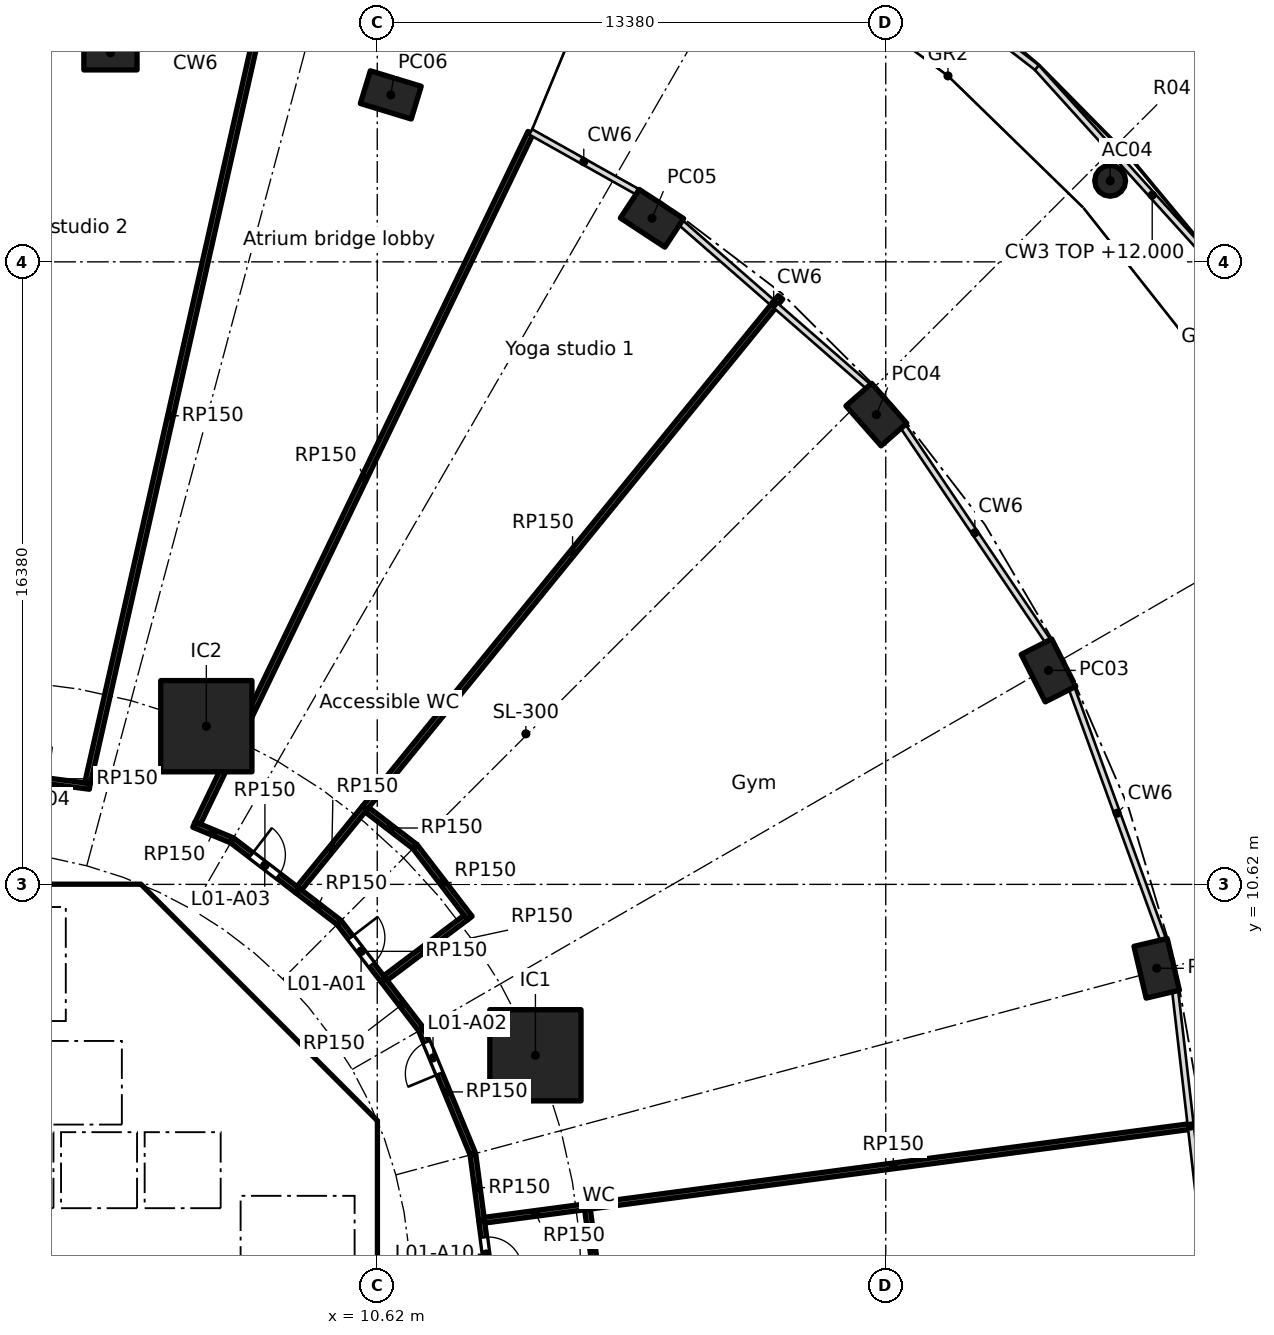
"""IFC4 building model, lengths in metres.
Left out: names, types, materials, properties, quantities, classifications, styles, units other than length and angle.
Written with IfcOpenShell. Run it as: python <this file> out.ifc"""

import sys

from ifc_helpers import new_model, si_unit, direction, frame, frame_2d, origin, origin_2d, place, context, subcontext, project, spatial, polyline, rectangle, hollow_rectangle, hollow_circle, outline, extrude, element, fill, save


model = new_model("IFC4")
c1 = context("Model", 3, precision=1e-05, world=origin(), true_north=direction((0.0, 1.0)))
c2 = subcontext(c1, "Body", "Model", "MODEL_VIEW")
j1 = project(units=[si_unit("LENGTHUNIT", "METRE"), si_unit("PLANEANGLEUNIT", "RADIAN")], contexts=[c1])
p1 = place(None, origin())
s1 = spatial("IfcSite", under=j1, at=p1, CompositionType="ELEMENT")
p2 = place(p1, origin())
s2 = spatial("IfcBuilding", under=s1, at=p2, CompositionType="ELEMENT")
p3 = place(p2, frame((0.0, 0.0, 7.0)))
s3 = spatial("IfcBuildingStorey", under=s2, at=p3, CompositionType="ELEMENT", Elevation=7.0)
for number, where, z_axis, x_axis in (
    (1, (31.129, 8.412, 0.0), (0.0, 0.0, 1.0), (-0.229, 0.973, 0.0)),
    (2, (28.282, 16.25, 0.0), (0.0, 0.0, 1.0), (-0.452, 0.892, 0.0)),
    (3, (23.752, 22.981, 0.0), (0.0, 0.0, 1.0), (-0.66, 0.751, 0.0)),
    (4, (17.85, 28.146, 0.0), (0.0, 0.0, 1.0), (-0.836, 0.549, 0.0)),
    (5, (10.976, 31.393, 0.0), (0.0, 0.0, 1.0), (-0.957, 0.292, 0.0)),
    (6, (3.6, 32.5, 0.0), (0.0, 0.0, 1.0), (-1.0, 0.0, 0.0)),
):
    element("IfcColumn", number, at=place(p3, frame(where, z_axis=z_axis, x_axis=x_axis)), inside=s3, PredefinedType="COLUMN", context=c2, shape_type="SweptSolid", body=[
        extrude(hollow_rectangle(XDim=1.4, YDim=0.9, WallThickness=0.05, at=origin_2d()), origin(), (0.0, 0.0, 1.0), 5.0),
    ])
for number, where, z_axis, x_axis in (
    (7, (14.782, 6.123, 0.0), (0.0, 0.0, 1.0), (1.0, 0.0, 0.0)),
    (8, (6.123, 14.782, 0.0), (0.0, 0.0, 1.0), (1.0, 0.0, 0.0)),
):
    element("IfcColumn", number, at=place(p3, frame(where, z_axis=z_axis, x_axis=x_axis)), inside=s3, PredefinedType="COLUMN", context=c2, shape_type="SweptSolid", body=[
        extrude(rectangle(XDim=2.4, YDim=2.4, at=origin_2d()), origin(), (0.0, 0.0, 1.0), 5.0),
    ])
p4 = place(p3, frame((29.904, 29.133, 0.0), z_axis=(0.0, 0.0, 1.0), x_axis=(1.0, 0.0, 0.0)))
e9 = element("IfcColumn", 9, at=p4, inside=s3, PredefinedType="COLUMN", context=c2, shape_type="SweptSolid", body=[
    extrude(hollow_circle(Radius=0.406, WallThickness=0.025, at=origin_2d()), origin(), (0.0, 0.0, 1.0), 5.0),
])
p5 = place(p3, frame((9.988, 4.613, 0.0), z_axis=(0.0, 0.0, 1.0), x_axis=(-0.707106781187, 0.707106781187, 0.0)))
e10 = element("IfcWall", 10, at=p5, inside=s3, PredefinedType="SHEAR", context=c2, shape_type="SweptSolid", body=[
    extrude(rectangle(XDim=7.602, YDim=0.6, at=frame_2d((3.801, 0.0))), origin(), (0.0, 0.0, 1.0), 4.7),
])
p6 = place(p5, frame((3.201, 0.0, 0.0)))
e11 = element("IfcOpeningElement", 11, at=p6, cuts=e10, PredefinedType="OPENING", context=c2, shape_type="SweptSolid", body=[
    extrude(rectangle(XDim=1.2, YDim=2.1, at=frame_2d((0.6, 1.05))), frame((0.0, 0.31, 0.0), z_axis=(0.0, -1.0, 0.0), x_axis=(1.0, 0.0, 0.0)), (0.0, 0.0, 1.0), 0.62),
])
p7 = place(p3, frame((4.0, 4.3, 0.0), z_axis=(0.0, 0.0, 1.0), x_axis=(0.0, 1.0, 0.0)))
e12 = element("IfcWall", 12, at=p7, inside=s3, PredefinedType="SOLIDWALL", context=c2, shape_type="SweptSolid", body=[
    extrude(rectangle(XDim=2.2, YDim=0.2, at=frame_2d((1.1, 0.0))), origin(), (0.0, 0.0, 1.0), 4.7),
])
p8 = place(p7, frame((0.55, 0.0, 0.0)))
e13 = element("IfcOpeningElement", 13, at=p8, cuts=e12, PredefinedType="OPENING", context=c2, shape_type="SweptSolid", body=[
    extrude(rectangle(XDim=1.1, YDim=2.1, at=frame_2d((0.55, 1.05))), frame((0.0, 0.11, 0.0), z_axis=(0.0, -1.0, 0.0), x_axis=(1.0, 0.0, 0.0)), (0.0, 0.0, 1.0), 0.22),
])
p9 = place(p3, frame((-6.7, 2.0, 0.0), z_axis=(0.0, 0.0, 1.0), x_axis=(1.0, 0.0, 0.0)))
e14 = element("IfcWall", 14, at=p9, inside=s3, PredefinedType="SOLIDWALL", context=c2, shape_type="SweptSolid", body=[
    extrude(rectangle(XDim=13.4, YDim=0.2, at=frame_2d((6.7, 0.0))), origin(), (0.0, 0.0, 1.0), 4.7),
])
p10 = place(p9, frame((0.65, 0.0, 0.0)))
e15 = element("IfcOpeningElement", 15, at=p10, cuts=e14, PredefinedType="OPENING", context=c2, shape_type="SweptSolid", body=[
    extrude(rectangle(XDim=1.1, YDim=2.1, at=frame_2d((0.55, 1.05))), frame((0.0, 0.11, 0.0), z_axis=(0.0, -1.0, 0.0), x_axis=(1.0, 0.0, 0.0)), (0.0, 0.0, 1.0), 0.22),
])
p11 = place(p9, frame((2.85, 0.0, 0.0)))
e16 = element("IfcOpeningElement", 16, at=p11, cuts=e14, PredefinedType="OPENING", context=c2, shape_type="SweptSolid", body=[
    extrude(rectangle(XDim=1.1, YDim=2.1, at=frame_2d((0.55, 1.05))), frame((0.0, 0.11, 0.0), z_axis=(0.0, -1.0, 0.0), x_axis=(1.0, 0.0, 0.0)), (0.0, 0.0, 1.0), 0.22),
])
p12 = place(p9, frame((5.05, 0.0, 0.0)))
e17 = element("IfcOpeningElement", 17, at=p12, cuts=e14, PredefinedType="OPENING", context=c2, shape_type="SweptSolid", body=[
    extrude(rectangle(XDim=1.1, YDim=2.1, at=frame_2d((0.55, 1.05))), frame((0.0, 0.11, 0.0), z_axis=(0.0, -1.0, 0.0), x_axis=(1.0, 0.0, 0.0)), (0.0, 0.0, 1.0), 0.22),
])
p13 = place(p3, frame((6.7, 4.0, 0.0), z_axis=(0.0, 0.0, 1.0), x_axis=(1.0, 0.0, 0.0)))
e18 = element("IfcWall", 18, at=p13, inside=s3, PredefinedType="SOLIDWALL", context=c2, shape_type="SweptSolid", body=[
    extrude(rectangle(XDim=3.325, YDim=0.2, at=frame_2d((1.662, 0.0))), origin(), (0.0, 0.0, 1.0), 4.7),
])
p14 = place(p13, frame((1.25, 0.0, 0.0)))
e19 = element("IfcOpeningElement", 19, at=p14, cuts=e18, PredefinedType="OPENING", context=c2, shape_type="SweptSolid", body=[
    extrude(rectangle(XDim=1.1, YDim=2.1, at=frame_2d((0.55, 1.05))), frame((0.0, 0.11, 0.0), z_axis=(0.0, -1.0, 0.0), x_axis=(1.0, 0.0, 0.0)), (0.0, 0.0, 1.0), 0.22),
])
p15 = place(p3, frame((4.0, 7.025, 0.0), z_axis=(0.0, 0.0, 1.0), x_axis=(0.0, 1.0, 0.0)))
e20 = element("IfcWall", 20, at=p15, inside=s3, PredefinedType="SOLIDWALL", context=c2, shape_type="SweptSolid", body=[
    extrude(rectangle(XDim=3.0, YDim=0.2, at=frame_2d((1.5, 0.0))), origin(), (0.0, 0.0, 1.0), 4.7),
])
p16 = place(p15, frame((0.925, 0.0, 0.0)))
e21 = element("IfcOpeningElement", 21, at=p16, cuts=e20, PredefinedType="OPENING", context=c2, shape_type="SweptSolid", body=[
    extrude(rectangle(XDim=1.1, YDim=2.1, at=frame_2d((0.55, 1.05))), frame((0.0, 0.11, 0.0), z_axis=(0.0, -1.0, 0.0), x_axis=(1.0, 0.0, 0.0)), (0.0, 0.0, 1.0), 0.22),
])
p17 = place(p3, origin())
e22 = element("IfcWall", 22, at=p17, inside=s3, PredefinedType="SHEAR", context=c2, shape_type="SweptSolid", body=[
    extrude(outline(polyline([(-4.152, 10.025), (-4.401, 9.776), (-4.825, 10.2), (-4.401, 10.625), (4.401, 10.625), (4.825, 10.2), (4.401, 9.776), (4.152, 10.025), (-4.152, 10.025)])), origin(), (0.0, 0.0, 1.0), 4.7),
])
p18 = place(p3, origin())
e23 = element("IfcWall", 23, at=p18, inside=s3, PredefinedType="SHEAR", context=c2, shape_type="SweptSolid", body=[
    extrude(outline(polyline([(9.776, -4.401), (10.025, -4.152), (10.025, -3.801), (10.025, 4.152), (9.776, 4.401), (10.2, 4.825), (10.625, 4.401), (10.625, -4.401), (10.2, -4.825), (9.776, -4.401)])), origin(), (0.0, 0.0, 1.0), 4.7),
])
p19 = place(p3, origin())
e24 = element("IfcWall", 24, at=p19, inside=s3, PredefinedType="SOLIDWALL", context=c2, shape_type="SweptSolid", body=[
    extrude(outline(polyline([(-6.5, 2.1), (-6.7, 2.1), (-6.7, 4.3), (6.7, 4.3), (6.7, 2.1), (6.5, 2.1), (6.5, 4.1), (4.5, 4.1), (4.5, 2.1), (4.3, 2.1), (4.3, 4.1), (2.3, 4.1), (2.3, 2.1), (2.1, 2.1), (2.1, 4.1), (0.1, 4.1), (0.1, 2.1), (-0.1, 2.1), (-0.1, 4.1), (-2.1, 4.1), (-2.1, 2.1), (-2.3, 2.1), (-2.3, 4.1), (-4.3, 4.1), (-4.3, 2.1), (-4.5, 2.1), (-4.5, 4.1), (-6.5, 4.1), (-6.5, 2.1)])), origin(), (0.0, 0.0, 1.0), 4.7),
])
p20 = place(p3, origin())
e25 = element("IfcWall", 25, at=p20, inside=s3, PredefinedType="SOLIDWALL", context=c2, shape_type="SweptSolid", body=[
    extrude(outline(polyline([(4.1, 6.5), (-4.1, 6.5), (-4.1, 7.025), (4.1, 7.025), (4.1, 6.5)])), origin(), (0.0, 0.0, 1.0), 4.7),
])
p21 = place(p3, origin())
e26 = element("IfcWall", 26, at=p21, inside=s3, PredefinedType="SOLIDWALL", context=c2, shape_type="SweptSolid", body=[
    extrude(outline(polyline([(7.025, -3.9), (6.7, -3.9), (6.7, 3.9), (7.025, 3.9), (7.025, -3.9)])), origin(), (0.0, 0.0, 1.0), 4.7),
])
p22 = place(p3, frame((0.012, 13.598, 0.0), z_axis=(0.0, 0.0, 1.0), x_axis=(0.991450776896, -0.130481251495, 0.0)))
e27 = element("IfcWall", 27, at=p22, inside=s3, PredefinedType="PARTITIONING", context=c2, shape_type="SweptSolid", body=[
    extrude(rectangle(XDim=3.071, YDim=0.15, at=frame_2d((1.535, 0.0))), origin(), (0.0, 0.0, 1.0), 4.7),
])
p23 = place(p22, frame((1.042, 0.0, 0.0)))
e28 = element("IfcOpeningElement", 28, at=p23, cuts=e27, PredefinedType="OPENING", context=c2, shape_type="SweptSolid", body=[
    extrude(rectangle(XDim=0.9, YDim=2.1, at=frame_2d((0.45, 1.05))), frame((0.0, 0.085, 0.0), z_axis=(0.0, -1.0, 0.0), x_axis=(1.0, 0.0, 0.0)), (0.0, 0.0, 1.0), 0.17),
])
p24 = place(p3, frame((2.998, 13.281, 0.0), z_axis=(0.0, 0.0, 1.0), x_axis=(0.220191699756, 0.975456618901, 0.0)))
e29 = element("IfcWall", 29, at=p24, inside=s3, PredefinedType="PARTITIONING", context=c2, shape_type="SweptSolid", body=[
    extrude(rectangle(XDim=19.825, YDim=0.15, at=frame_2d((9.912, 0.0))), origin(), (0.0, 0.0, 1.0), 4.7),
])
p25 = place(p3, frame((5.795, 12.194, 0.0), z_axis=(0.0, 0.0, 1.0), x_axis=(0.923867429555, -0.382712650179, 0.0)))
e30 = element("IfcWall", 30, at=p25, inside=s3, PredefinedType="PARTITIONING", context=c2, shape_type="SweptSolid", body=[
    extrude(rectangle(XDim=1.075, YDim=0.15, at=frame_2d((0.538, 0.0))), origin(), (0.0, 0.0, 1.0), 4.7),
])
p26 = place(p3, frame((6.809, 11.771, 0.0), z_axis=(0.0, 0.0, 1.0), x_axis=(0.793372937326, -0.608735888805, 0.0)))
e31 = element("IfcWall", 31, at=p26, inside=s3, PredefinedType="PARTITIONING", context=c2, shape_type="SweptSolid", body=[
    extrude(rectangle(XDim=2.155, YDim=0.15, at=frame_2d((1.078, 0.0))), origin(), (0.0, 0.0, 1.0), 4.7),
])
p27 = place(p26, frame((0.622, 0.0, 0.0)))
e32 = element("IfcOpeningElement", 32, at=p27, cuts=e31, PredefinedType="OPENING", context=c2, shape_type="SweptSolid", body=[
    extrude(rectangle(XDim=0.9, YDim=2.1, at=frame_2d((0.45, 1.05))), frame((0.0, 0.085, 0.0), z_axis=(0.0, -1.0, 0.0), x_axis=(1.0, 0.0, 0.0)), (0.0, 0.0, 1.0), 0.17),
])
p28 = place(p3, frame((8.519, 10.459, 0.0), z_axis=(0.0, 0.0, 1.0), x_axis=(0.793371316762, -0.6087380009, 0.0)))
e33 = element("IfcWall", 33, at=p28, inside=s3, PredefinedType="PARTITIONING", context=c2, shape_type="SweptSolid", body=[
    extrude(rectangle(XDim=1.371, YDim=0.15, at=frame_2d((0.686, 0.0))), origin(), (0.0, 0.0, 1.0), 4.7),
])
p29 = place(p3, frame((8.567, 10.517, 0.0), z_axis=(0.0, 0.0, 1.0), x_axis=(0.631573271363, 0.775316195432, 0.0)))
e34 = element("IfcWall", 34, at=p29, inside=s3, PredefinedType="PARTITIONING", context=c2, shape_type="SweptSolid", body=[
    extrude(rectangle(XDim=2.726, YDim=0.15, at=frame_2d((1.363, 0.0))), origin(), (0.0, 0.0, 1.0), 4.7),
])
p30 = place(p3, frame((9.624, 9.607, 0.0), z_axis=(0.0, 0.0, 1.0), x_axis=(0.608754453805, -0.793358692504, 0.0)))
e35 = element("IfcWall", 35, at=p30, inside=s3, PredefinedType="PARTITIONING", context=c2, shape_type="SweptSolid", body=[
    extrude(rectangle(XDim=1.888, YDim=0.15, at=frame_2d((0.944, 0.0))), origin(), (0.0, 0.0, 1.0), 4.7),
])
p31 = place(p30, frame((0.488, 0.0, 0.0)))
e36 = element("IfcOpeningElement", 36, at=p31, cuts=e35, PredefinedType="OPENING", context=c2, shape_type="SweptSolid", body=[
    extrude(rectangle(XDim=0.9, YDim=2.1, at=frame_2d((0.45, 1.05))), frame((0.0, 0.085, 0.0), z_axis=(0.0, -1.0, 0.0), x_axis=(1.0, 0.0, 0.0)), (0.0, 0.0, 1.0), 0.17),
])
p32 = place(p3, frame((10.348, 12.585, 0.0), z_axis=(0.0, 0.0, 1.0), x_axis=(0.793328373205, -0.608793965368, 0.0)))
e37 = element("IfcWall", 37, at=p32, inside=s3, PredefinedType="PARTITIONING", context=c2, shape_type="SweptSolid", body=[
    extrude(rectangle(XDim=1.584, YDim=0.15, at=frame_2d((0.792, 0.0))), origin(), (0.0, 0.0, 1.0), 4.7),
])
p33 = place(p3, frame((10.288, 12.631, 0.0), z_axis=(0.0, 0.0, 1.0), x_axis=(0.631546535922, 0.77533797338, 0.0)))
e38 = element("IfcWall", 38, at=p33, inside=s3, PredefinedType="PARTITIONING", context=c2, shape_type="SweptSolid", body=[
    extrude(rectangle(XDim=17.325, YDim=0.15, at=frame_2d((8.663, 0.0))), origin(), (0.0, 0.0, 1.0), 4.7),
])
p34 = place(p3, frame((10.774, 8.109, 0.0), z_axis=(0.0, 0.0, 1.0), x_axis=(0.608716251771, -0.793388003961, 0.0)))
e39 = element("IfcWall", 39, at=p34, inside=s3, PredefinedType="PARTITIONING", context=c2, shape_type="SweptSolid", body=[
    extrude(rectangle(XDim=1.638, YDim=0.15, at=frame_2d((0.819, 0.0))), origin(), (0.0, 0.0, 1.0), 4.7),
])
p35 = place(p3, frame((11.621, 11.604, 0.0), z_axis=(0.0, 0.0, 1.0), x_axis=(0.608759688573, -0.793354675771, 0.0)))
e40 = element("IfcWall", 40, at=p35, inside=s3, PredefinedType="PARTITIONING", context=c2, shape_type="SweptSolid", body=[
    extrude(rectangle(XDim=2.358, YDim=0.15, at=frame_2d((1.179, 0.0))), origin(), (0.0, 0.0, 1.0), 4.7),
])
p36 = place(p3, frame((11.782, 6.789, 0.0), z_axis=(0.0, 0.0, 1.0), x_axis=(0.382677866108, -0.923881838111, 0.0)))
e41 = element("IfcWall", 41, at=p36, inside=s3, PredefinedType="PARTITIONING", context=c2, shape_type="SweptSolid", body=[
    extrude(rectangle(XDim=3.527, YDim=0.15, at=frame_2d((1.763, 0.0))), origin(), (0.0, 0.0, 1.0), 4.7),
])
p37 = place(p36, frame((0.346, 0.0, 0.0)))
e42 = element("IfcOpeningElement", 42, at=p37, cuts=e41, PredefinedType="OPENING", context=c2, shape_type="SweptSolid", body=[
    extrude(rectangle(XDim=0.9, YDim=2.1, at=frame_2d((0.45, 1.05))), frame((0.0, 0.085, 0.0), z_axis=(0.0, -1.0, 0.0), x_axis=(1.0, 0.0, 0.0)), (0.0, 0.0, 1.0), 0.17),
])
p38 = place(p3, frame((12.951, 9.748, 0.0), z_axis=(0.0, 0.0, 1.0), x_axis=(-0.798970748419, -0.601369888813, 0.0)))
e43 = element("IfcWall", 43, at=p38, inside=s3, PredefinedType="PARTITIONING", context=c2, shape_type="SweptSolid", body=[
    extrude(rectangle(XDim=2.65, YDim=0.15, at=frame_2d((1.325, 0.0))), origin(), (0.0, 0.0, 1.0), 4.7),
])
p39 = place(p3, frame((13.138, 3.508, 0.0), z_axis=(0.0, 0.0, 1.0), x_axis=(0.130526735914, -0.991444789795, 0.0)))
e44 = element("IfcWall", 44, at=p39, inside=s3, PredefinedType="PARTITIONING", context=c2, shape_type="SweptSolid", body=[
    extrude(rectangle(XDim=1.749, YDim=0.15, at=frame_2d((0.875, 0.0))), origin(), (0.0, 0.0, 1.0), 4.7),
])
p40 = place(p3, frame((13.366, 1.774, 0.0), z_axis=(0.0, 0.0, 1.0), x_axis=(0.130472275964, -0.991451958092, 0.0)))
e45 = element("IfcWall", 45, at=p40, inside=s3, PredefinedType="PARTITIONING", context=c2, shape_type="SweptSolid", body=[
    extrude(rectangle(XDim=1.778, YDim=0.15, at=frame_2d((0.889, 0.0))), origin(), (0.0, 0.0, 1.0), 4.7),
])
p41 = place(p40, frame((0.445, 0.0, 0.0)))
e46 = element("IfcOpeningElement", 46, at=p41, cuts=e45, PredefinedType="OPENING", context=c2, shape_type="SweptSolid", body=[
    extrude(rectangle(XDim=0.9, YDim=2.1, at=frame_2d((0.45, 1.05))), frame((0.0, 0.085, 0.0), z_axis=(0.0, -1.0, 0.0), x_axis=(1.0, 0.0, 0.0)), (0.0, 0.0, 1.0), 0.17),
])
p42 = place(p3, frame((14.654, 30.398, 0.0), z_axis=(0.0, 0.0, 1.0), x_axis=(-0.434261119912, -0.900787033506, 0.0)))
e47 = element("IfcWall", 47, at=p42, inside=s3, PredefinedType="PARTITIONING", context=c2, shape_type="SweptSolid", body=[
    extrude(rectangle(XDim=20.166, YDim=0.15, at=frame_2d((10.083, 0.0))), origin(), (0.0, 0.0, 1.0), 4.7),
])
p43 = place(p3, frame((16.142, 2.143, 0.0), z_axis=(0.0, 0.0, 1.0), x_axis=(-0.991302075381, -0.131606213171, 0.0)))
e48 = element("IfcWall", 48, at=p43, inside=s3, PredefinedType="PARTITIONING", context=c2, shape_type="SweptSolid", body=[
    extrude(rectangle(XDim=2.725, YDim=0.15, at=frame_2d((1.363, 0.0))), origin(), (0.0, 0.0, 1.0), 4.7),
])
p44 = place(p3, frame((16.152, 2.068, 0.0), z_axis=(0.0, 0.0, 1.0), x_axis=(0.130536722516, -0.991443474977, 0.0)))
e49 = element("IfcWall", 49, at=p44, inside=s3, PredefinedType="PARTITIONING", context=c2, shape_type="SweptSolid", body=[
    extrude(rectangle(XDim=2.074, YDim=0.15, at=frame_2d((1.037, 0.0))), origin(), (0.0, 0.0, 1.0), 4.7),
])
p45 = place(p3, frame((32.253, 4.281, 0.0), z_axis=(0.0, 0.0, 1.0), x_axis=(-0.991306050086, -0.131576270896, 0.0)))
e50 = element("IfcWall", 50, at=p45, inside=s3, PredefinedType="PARTITIONING", context=c2, shape_type="SweptSolid", body=[
    extrude(rectangle(XDim=16.252, YDim=0.15, at=frame_2d((8.126, 0.0))), origin(), (0.0, 0.0, 1.0), 4.7),
])
p46 = place(p8, origin())
e51 = element("IfcDoor", 51, at=p46, inside=s3, OperationType="DOUBLE_DOOR_SLIDING", PredefinedType="DOOR", context=c2, shape_type="SweptSolid", body=[
    extrude(rectangle(XDim=1.1, YDim=2.1, at=frame_2d((0.55, 1.05))), frame((0.0, 0.025, 0.0), z_axis=(0.0, -1.0, 0.0), x_axis=(1.0, 0.0, 0.0)), (0.0, 0.0, 1.0), 0.05),
])
fill(e13, e51)
p47 = place(p14, frame((1.1, 0.0, 0.0), x_axis=(-1.0, 0.0, 0.0)))
e52 = element("IfcDoor", 52, at=p47, inside=s3, OperationType="SINGLE_SWING_LEFT", PredefinedType="DOOR", context=c2, shape_type="SweptSolid", body=[
    extrude(rectangle(XDim=1.1, YDim=2.1, at=frame_2d((0.55, 1.05))), frame((0.0, 0.025, 0.0), z_axis=(0.0, -1.0, 0.0), x_axis=(1.0, 0.0, 0.0)), (0.0, 0.0, 1.0), 0.05),
])
fill(e19, e52)
p48 = place(p16, origin())
e53 = element("IfcDoor", 53, at=p48, inside=s3, OperationType="SINGLE_SWING_RIGHT", PredefinedType="DOOR", context=c2, shape_type="SweptSolid", body=[
    extrude(rectangle(XDim=1.1, YDim=2.1, at=frame_2d((0.55, 1.05))), frame((0.0, 0.025, 0.0), z_axis=(0.0, -1.0, 0.0), x_axis=(1.0, 0.0, 0.0)), (0.0, 0.0, 1.0), 0.05),
])
fill(e21, e53)
p49 = place(p6, origin())
e54 = element("IfcDoor", 54, at=p49, inside=s3, OperationType="SINGLE_SWING_LEFT", PredefinedType="DOOR", context=c2, shape_type="SweptSolid", body=[
    extrude(rectangle(XDim=1.2, YDim=2.1, at=frame_2d((0.6, 1.05))), frame((0.0, 0.025, 0.0), z_axis=(0.0, -1.0, 0.0), x_axis=(1.0, 0.0, 0.0)), (0.0, 0.0, 1.0), 0.05),
])
fill(e11, e54)
p50 = place(p31, origin())
e55 = element("IfcDoor", 55, at=p50, inside=s3, OperationType="SINGLE_SWING_LEFT", PredefinedType="DOOR", context=c2, shape_type="SweptSolid", body=[
    extrude(rectangle(XDim=0.9, YDim=2.1, at=frame_2d((0.45, 1.05))), frame((0.0, 0.025, 0.0), z_axis=(0.0, -1.0, 0.0), x_axis=(1.0, 0.0, 0.0)), (0.0, 0.0, 1.0), 0.05),
])
fill(e36, e55)
p51 = place(p37, frame((0.9, 0.0, 0.0), x_axis=(-1.0, 0.0, 0.0)))
e56 = element("IfcDoor", 56, at=p51, inside=s3, OperationType="SINGLE_SWING_LEFT", PredefinedType="DOOR", context=c2, shape_type="SweptSolid", body=[
    extrude(rectangle(XDim=0.9, YDim=2.1, at=frame_2d((0.45, 1.05))), frame((0.0, 0.025, 0.0), z_axis=(0.0, -1.0, 0.0), x_axis=(1.0, 0.0, 0.0)), (0.0, 0.0, 1.0), 0.05),
])
fill(e42, e56)
p52 = place(p27, origin())
e57 = element("IfcDoor", 57, at=p52, inside=s3, OperationType="SINGLE_SWING_LEFT", PredefinedType="DOOR", context=c2, shape_type="SweptSolid", body=[
    extrude(rectangle(XDim=0.9, YDim=2.1, at=frame_2d((0.45, 1.05))), frame((0.0, 0.025, 0.0), z_axis=(0.0, -1.0, 0.0), x_axis=(1.0, 0.0, 0.0)), (0.0, 0.0, 1.0), 0.05),
])
fill(e32, e57)
p53 = place(p41, origin())
e58 = element("IfcDoor", 58, at=p53, inside=s3, OperationType="SINGLE_SWING_RIGHT", PredefinedType="DOOR", context=c2, shape_type="SweptSolid", body=[
    extrude(rectangle(XDim=0.9, YDim=2.1, at=frame_2d((0.45, 1.05))), frame((0.0, 0.025, 0.0), z_axis=(0.0, -1.0, 0.0), x_axis=(1.0, 0.0, 0.0)), (0.0, 0.0, 1.0), 0.05),
])
fill(e46, e58)
save(model, sys.argv[1])
